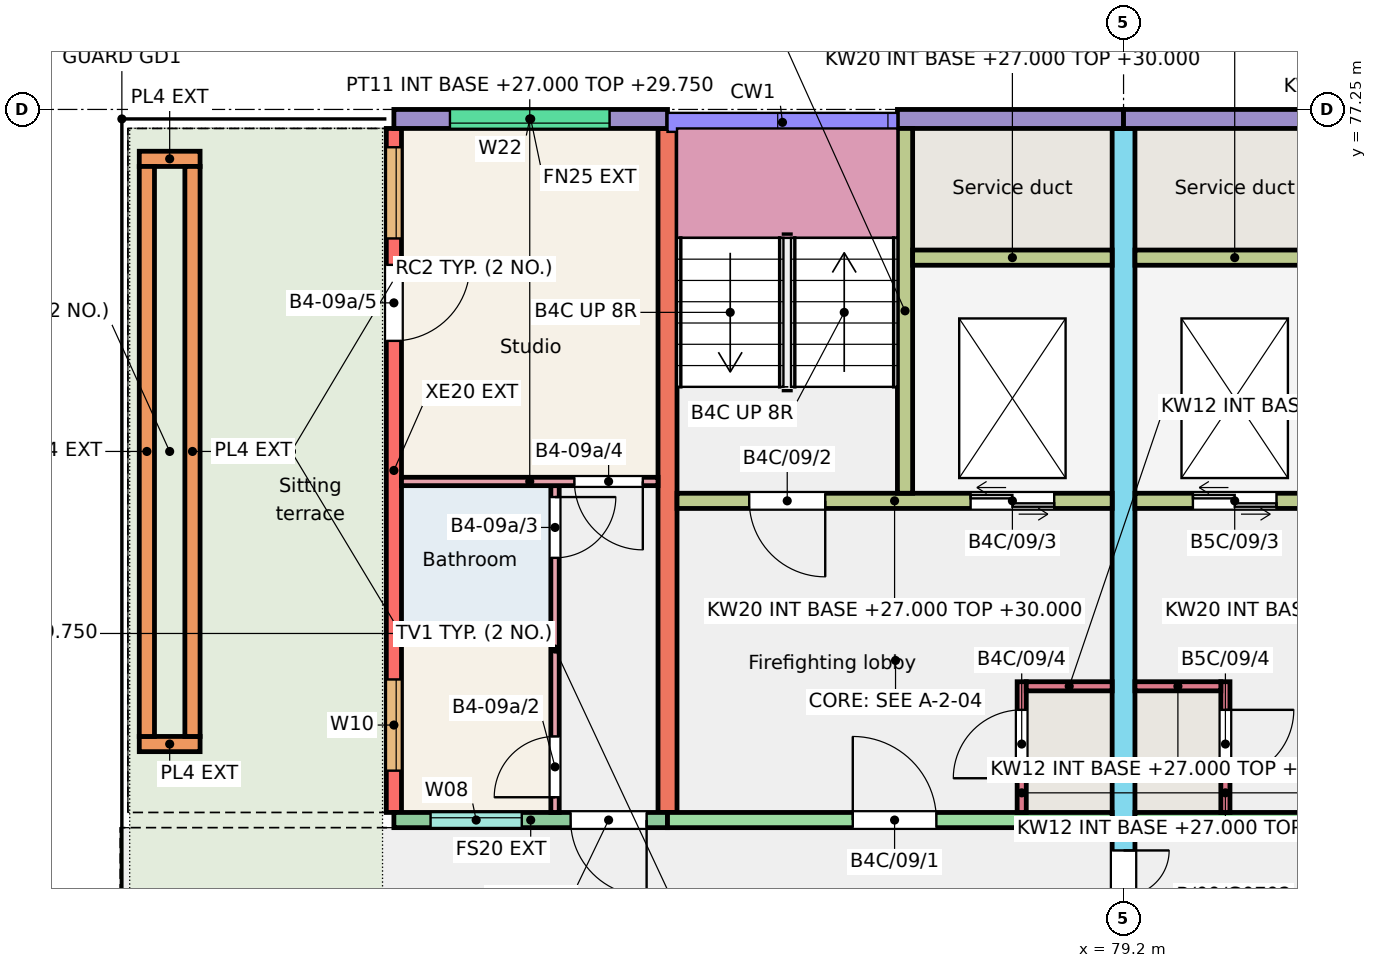
"""IFC4 building model, lengths in metres.
Left out: names, types, materials, properties, quantities, classifications, styles, units other than length and angle.
Written with IfcOpenShell. Run it as: python <this file> out.ifc"""

import sys

from ifc_helpers import new_model, si_unit, direction, frame, frame_2d, origin, place, context, subcontext, project, spatial, rectangle, extrude, element, fill, save


model = new_model("IFC4")
c1 = context("Model", 3, precision=1e-05, world=origin(), true_north=direction((0.0, 1.0)))
c2 = subcontext(c1, "Body", "Model", "MODEL_VIEW")
j1 = project(units=[si_unit("LENGTHUNIT", "METRE"), si_unit("PLANEANGLEUNIT", "RADIAN")], contexts=[c1])
p1 = place(None, origin())
s1 = spatial("IfcSite", under=j1, at=p1, CompositionType="ELEMENT")
p2 = place(p1, origin())
s2 = spatial("IfcBuilding", under=s1, at=p2, CompositionType="ELEMENT")
p3 = place(p2, frame((0.0, 0.0, 27.0)))
s3 = spatial("IfcBuildingStorey", under=s2, at=p3, CompositionType="ELEMENT", Elevation=27.0)
p4 = place(p3, frame((69.6, 68.0, 0.0), z_axis=(0.0, 0.0, 1.0), x_axis=(0.0, 1.0, 0.0)))
e1 = element("IfcWall", 1, at=p4, inside=s3, PredefinedType="SHEAR", context=c2, shape_type="SweptSolid", body=[
    extrude(rectangle(XDim=9.0, YDim=0.2, at=frame_2d((4.5, 0.0))), origin(), (0.0, 0.0, 1.0), 3.0),
])
p5 = place(p4, frame((0.55, 0.0, 0.9)))
e2 = element("IfcOpeningElement", 2, at=p5, cuts=e1, PredefinedType="OPENING", context=c2, shape_type="SweptSolid", body=[
    extrude(rectangle(XDim=1.2, YDim=1.5, at=frame_2d((0.6, 0.75))), frame((0.0, 0.11, 0.0), z_axis=(0.0, -1.0, 0.0), x_axis=(1.0, 0.0, 0.0)), (0.0, 0.0, 1.0), 0.22),
])
p6 = place(p4, frame((7.552, 0.0, 0.9)))
e3 = element("IfcOpeningElement", 3, at=p6, cuts=e1, PredefinedType="OPENING", context=c2, shape_type="SweptSolid", body=[
    extrude(rectangle(XDim=1.2, YDim=1.5, at=frame_2d((0.6, 0.75))), frame((0.0, 0.11, 0.0), z_axis=(0.0, -1.0, 0.0), x_axis=(1.0, 0.0, 0.0)), (0.0, 0.0, 1.0), 0.22),
])
p7 = place(p4, frame((6.205, 0.0, 0.0)))
e4 = element("IfcOpeningElement", 4, at=p7, cuts=e1, PredefinedType="OPENING", context=c2, shape_type="SweptSolid", body=[
    extrude(rectangle(XDim=1.0, YDim=2.1, at=frame_2d((0.5, 1.05))), frame((0.0, 0.11, 0.0), z_axis=(0.0, -1.0, 0.0), x_axis=(1.0, 0.0, 0.0)), (0.0, 0.0, 1.0), 0.22),
])
p8 = place(p3, frame((73.2, 68.0, 0.0), z_axis=(0.0, 0.0, 1.0), x_axis=(0.0, 1.0, 0.0)))
e5 = element("IfcWall", 5, at=p8, inside=s3, PredefinedType="SHEAR", context=c2, shape_type="SweptSolid", body=[
    extrude(rectangle(XDim=9.0, YDim=0.25, at=frame_2d((4.5, 0.0))), origin(), (0.0, 0.0, 1.0), 3.0),
])
p9 = place(p3, frame((79.2, 66.0, 0.0), z_axis=(0.0, 0.0, 1.0), x_axis=(0.0, 1.0, 0.0)))
e6 = element("IfcWall", 6, at=p9, inside=s3, PredefinedType="SHEAR", context=c2, shape_type="SweptSolid", body=[
    extrude(rectangle(XDim=11.0, YDim=0.3, at=frame_2d((5.5, 0.0))), origin(), (0.0, 0.0, 1.0), 3.0),
])
p10 = place(p9, frame((0.3, 0.0, 0.0)))
e7 = element("IfcOpeningElement", 7, at=p10, cuts=e6, PredefinedType="OPENING", context=c2, shape_type="SweptSolid", body=[
    extrude(rectangle(XDim=1.2, YDim=2.1, at=frame_2d((0.6, 1.05))), frame((0.0, 0.16, 0.0), z_axis=(0.0, -1.0, 0.0), x_axis=(1.0, 0.0, 0.0)), (0.0, 0.0, 1.0), 0.32),
])
p11 = place(p3, frame((69.6, 77.125, 0.0), z_axis=(0.0, 0.0, 1.0), x_axis=(1.0, 0.0, 0.0)))
e8 = element("IfcWall", 8, at=p11, inside=s3, PredefinedType="SOLIDWALL", context=c2, shape_type="SweptSolid", body=[
    extrude(rectangle(XDim=3.6, YDim=0.25, at=frame_2d((1.8, 0.0))), origin(), (0.0, 0.0, 1.0), 3.0),
])
p12 = place(p11, frame((0.738, 0.0, 1.2)))
e9 = element("IfcOpeningElement", 9, at=p12, cuts=e8, PredefinedType="OPENING", context=c2, shape_type="SweptSolid", body=[
    extrude(rectangle(XDim=2.1, YDim=1.2, at=frame_2d((1.05, 0.6))), frame((0.0, 0.135, 0.0), z_axis=(0.0, -1.0, 0.0), x_axis=(1.0, 0.0, 0.0)), (0.0, 0.0, 1.0), 0.27),
])
p13 = place(p3, frame((69.6, 67.9, 0.0), z_axis=(0.0, 0.0, 1.0), x_axis=(1.0, 0.0, 0.0)))
e10 = element("IfcWall", 10, at=p13, inside=s3, PredefinedType="SOLIDWALL", context=c2, shape_type="SweptSolid", body=[
    extrude(rectangle(XDim=3.6, YDim=0.2, at=frame_2d((1.8, 0.0))), origin(), (0.0, 0.0, 1.0), 3.0),
])
p14 = place(p13, frame((0.482, 0.0, 1.1)))
e11 = element("IfcOpeningElement", 11, at=p14, cuts=e10, PredefinedType="OPENING", context=c2, shape_type="SweptSolid", body=[
    extrude(rectangle(XDim=1.2, YDim=1.3, at=frame_2d((0.6, 0.65))), frame((0.0, 0.11, 0.0), z_axis=(0.0, -1.0, 0.0), x_axis=(1.0, 0.0, 0.0)), (0.0, 0.0, 1.0), 0.22),
])
p15 = place(p13, frame((2.325, 0.0, 0.0)))
e12 = element("IfcOpeningElement", 12, at=p15, cuts=e10, PredefinedType="OPENING", context=c2, shape_type="SweptSolid", body=[
    extrude(rectangle(XDim=1.0, YDim=2.1, at=frame_2d((0.5, 1.05))), frame((0.0, 0.11, 0.0), z_axis=(0.0, -1.0, 0.0), x_axis=(1.0, 0.0, 0.0)), (0.0, 0.0, 1.0), 0.22),
])
p16 = place(p3, frame((76.225, 77.125, 0.0), z_axis=(0.0, 0.0, 1.0), x_axis=(1.0, 0.0, 0.0)))
e13 = element("IfcWall", 13, at=p16, inside=s3, PredefinedType="SOLIDWALL", context=c2, shape_type="SweptSolid", body=[
    extrude(rectangle(XDim=2.975, YDim=0.25, at=frame_2d((1.487, 0.0))), origin(), (0.0, 0.0, 1.0), 3.0),
])
p17 = place(p3, frame((73.2, 67.9, 0.0), z_axis=(0.0, 0.0, 1.0), x_axis=(1.0, 0.0, 0.0)))
e14 = element("IfcWall", 14, at=p17, inside=s3, PredefinedType="SHEAR", context=c2, shape_type="SweptSolid", body=[
    extrude(rectangle(XDim=5.85, YDim=0.2, at=frame_2d((2.925, 0.0))), origin(), (0.0, 0.0, 1.0), 3.0),
])
p18 = place(p17, frame((2.438, 0.0, 0.0)))
e15 = element("IfcOpeningElement", 15, at=p18, cuts=e14, PredefinedType="OPENING", context=c2, shape_type="SweptSolid", body=[
    extrude(rectangle(XDim=1.1, YDim=2.1, at=frame_2d((0.55, 1.05))), frame((0.0, 0.11, 0.0), z_axis=(0.0, -1.0, 0.0), x_axis=(1.0, 0.0, 0.0)), (0.0, 0.0, 1.0), 0.22),
])
p19 = place(p3, frame((73.325, 72.1, 0.0), z_axis=(0.0, 0.0, 1.0), x_axis=(1.0, 0.0, 0.0)))
e16 = element("IfcWall", 16, at=p19, inside=s3, PredefinedType="SHEAR", context=c2, shape_type="SweptSolid", body=[
    extrude(rectangle(XDim=5.725, YDim=0.2, at=frame_2d((2.863, 0.0))), origin(), (0.0, 0.0, 1.0), 3.0),
])
p20 = place(p19, frame((0.95, 0.0, 0.0)))
e17 = element("IfcOpeningElement", 17, at=p20, cuts=e16, PredefinedType="OPENING", context=c2, shape_type="SweptSolid", body=[
    extrude(rectangle(XDim=1.0, YDim=2.1, at=frame_2d((0.5, 1.05))), frame((0.0, 0.11, 0.0), z_axis=(0.0, -1.0, 0.0), x_axis=(1.0, 0.0, 0.0)), (0.0, 0.0, 1.0), 0.22),
])
p21 = place(p19, frame((3.863, 0.0, 0.0)))
e18 = element("IfcOpeningElement", 18, at=p21, cuts=e16, PredefinedType="OPENING", context=c2, shape_type="SweptSolid", body=[
    extrude(rectangle(XDim=1.1, YDim=2.1, at=frame_2d((0.55, 1.05))), frame((0.0, 0.11, 0.0), z_axis=(0.0, -1.0, 0.0), x_axis=(1.0, 0.0, 0.0)), (0.0, 0.0, 1.0), 0.22),
])
p22 = place(p3, frame((76.325, 72.2, 0.0), z_axis=(0.0, 0.0, 1.0), x_axis=(0.0, 1.0, 0.0)))
e19 = element("IfcWall", 19, at=p22, inside=s3, PredefinedType="SHEAR", context=c2, shape_type="SweptSolid", body=[
    extrude(rectangle(XDim=4.8, YDim=0.2, at=frame_2d((2.4, 0.0))), origin(), (0.0, 0.0, 1.0), 3.0),
])
p23 = place(p3, frame((76.425, 75.3, 0.0), z_axis=(0.0, 0.0, 1.0), x_axis=(1.0, 0.0, 0.0)))
e20 = element("IfcWall", 20, at=p23, inside=s3, PredefinedType="SHEAR", context=c2, shape_type="SweptSolid", body=[
    extrude(rectangle(XDim=2.625, YDim=0.2, at=frame_2d((1.312, 0.0))), origin(), (0.0, 0.0, 1.0), 3.0),
])
p24 = place(p3, frame((77.86, 68.0, 0.0), z_axis=(0.0, 0.0, 1.0), x_axis=(0.0, 1.0, 0.0)))
e21 = element("IfcWall", 21, at=p24, inside=s3, PredefinedType="SHEAR", context=c2, shape_type="SweptSolid", body=[
    extrude(rectangle(XDim=1.72, YDim=0.12, at=frame_2d((0.86, 0.0))), origin(), (0.0, 0.0, 1.0), 3.0),
])
p25 = place(p24, frame((0.45, 0.0, 0.0)))
e22 = element("IfcOpeningElement", 22, at=p25, cuts=e21, PredefinedType="OPENING", context=c2, shape_type="SweptSolid", body=[
    extrude(rectangle(XDim=0.9, YDim=2.1, at=frame_2d((0.45, 1.05))), frame((0.0, 0.07, 0.0), z_axis=(0.0, -1.0, 0.0), x_axis=(1.0, 0.0, 0.0)), (0.0, 0.0, 1.0), 0.14),
])
p26 = place(p3, frame((77.92, 69.66, 0.0), z_axis=(0.0, 0.0, 1.0), x_axis=(1.0, 0.0, 0.0)))
e23 = element("IfcWall", 23, at=p26, inside=s3, PredefinedType="SHEAR", context=c2, shape_type="SweptSolid", body=[
    extrude(rectangle(XDim=1.13, YDim=0.12, at=frame_2d((0.565, 0.0))), origin(), (0.0, 0.0, 1.0), 3.0),
])
p27 = place(p3, frame((79.2, 77.125, 0.0), z_axis=(0.0, 0.0, 1.0), x_axis=(1.0, 0.0, 0.0)))
e24 = element("IfcWall", 24, at=p27, inside=s3, PredefinedType="SOLIDWALL", context=c2, shape_type="SweptSolid", body=[
    extrude(rectangle(XDim=2.975, YDim=0.25, at=frame_2d((1.488, 0.0))), origin(), (0.0, 0.0, 1.0), 3.0),
])
p28 = place(p3, frame((79.35, 67.9, 0.0), z_axis=(0.0, 0.0, 1.0), x_axis=(1.0, 0.0, 0.0)))
e25 = element("IfcWall", 25, at=p28, inside=s3, PredefinedType="SHEAR", context=c2, shape_type="SweptSolid", body=[
    extrude(rectangle(XDim=5.85, YDim=0.2, at=frame_2d((2.925, 0.0))), origin(), (0.0, 0.0, 1.0), 2.75),
])
p29 = place(p28, frame((2.312, 0.0, 0.0)))
e26 = element("IfcOpeningElement", 26, at=p29, cuts=e25, PredefinedType="OPENING", context=c2, shape_type="SweptSolid", body=[
    extrude(rectangle(XDim=1.1, YDim=2.1, at=frame_2d((0.55, 1.05))), frame((0.0, 0.11, 0.0), z_axis=(0.0, -1.0, 0.0), x_axis=(1.0, 0.0, 0.0)), (0.0, 0.0, 1.0), 0.22),
])
p30 = place(p3, frame((79.35, 72.1, 0.0), z_axis=(0.0, 0.0, 1.0), x_axis=(1.0, 0.0, 0.0)))
e27 = element("IfcWall", 27, at=p30, inside=s3, PredefinedType="SHEAR", context=c2, shape_type="SweptSolid", body=[
    extrude(rectangle(XDim=5.725, YDim=0.2, at=frame_2d((2.862, 0.0))), origin(), (0.0, 0.0, 1.0), 2.75),
])
p31 = place(p30, frame((3.775, 0.0, 0.0)))
e28 = element("IfcOpeningElement", 28, at=p31, cuts=e27, PredefinedType="OPENING", context=c2, shape_type="SweptSolid", body=[
    extrude(rectangle(XDim=1.0, YDim=2.1, at=frame_2d((0.5, 1.05))), frame((0.0, 0.11, 0.0), z_axis=(0.0, -1.0, 0.0), x_axis=(1.0, 0.0, 0.0)), (0.0, 0.0, 1.0), 0.22),
])
p32 = place(p30, frame((0.762, 0.0, 0.0)))
e29 = element("IfcOpeningElement", 29, at=p32, cuts=e27, PredefinedType="OPENING", context=c2, shape_type="SweptSolid", body=[
    extrude(rectangle(XDim=1.1, YDim=2.1, at=frame_2d((0.55, 1.05))), frame((0.0, 0.11, 0.0), z_axis=(0.0, -1.0, 0.0), x_axis=(1.0, 0.0, 0.0)), (0.0, 0.0, 1.0), 0.22),
])
p33 = place(p3, frame((79.35, 75.3, 0.0), z_axis=(0.0, 0.0, 1.0), x_axis=(1.0, 0.0, 0.0)))
e30 = element("IfcWall", 30, at=p33, inside=s3, PredefinedType="SHEAR", context=c2, shape_type="SweptSolid", body=[
    extrude(rectangle(XDim=2.625, YDim=0.2, at=frame_2d((1.312, 0.0))), origin(), (0.0, 0.0, 1.0), 2.75),
])
p34 = place(p3, frame((80.54, 68.0, 0.0), z_axis=(0.0, 0.0, 1.0), x_axis=(0.0, 1.0, 0.0)))
e31 = element("IfcWall", 31, at=p34, inside=s3, PredefinedType="SHEAR", context=c2, shape_type="SweptSolid", body=[
    extrude(rectangle(XDim=1.72, YDim=0.12, at=frame_2d((0.86, 0.0))), origin(), (0.0, 0.0, 1.0), 2.75),
])
p35 = place(p34, frame((0.45, 0.0, 0.0)))
e32 = element("IfcOpeningElement", 32, at=p35, cuts=e31, PredefinedType="OPENING", context=c2, shape_type="SweptSolid", body=[
    extrude(rectangle(XDim=0.9, YDim=2.1, at=frame_2d((0.45, 1.05))), frame((0.0, 0.07, 0.0), z_axis=(0.0, -1.0, 0.0), x_axis=(1.0, 0.0, 0.0)), (0.0, 0.0, 1.0), 0.14),
])
p36 = place(p3, frame((79.35, 69.66, 0.0), z_axis=(0.0, 0.0, 1.0), x_axis=(1.0, 0.0, 0.0)))
e33 = element("IfcWall", 33, at=p36, inside=s3, PredefinedType="SHEAR", context=c2, shape_type="SweptSolid", body=[
    extrude(rectangle(XDim=1.13, YDim=0.12, at=frame_2d((0.565, 0.0))), origin(), (0.0, 0.0, 1.0), 2.75),
])
for number, where, z_axis, x_axis in (
    (34, (66.25, 68.9, 0.01), (0.0, 0.0, 1.0), (1.0, 0.0, 0.0)),
    (35, (66.25, 76.6, 0.01), (0.0, 0.0, 1.0), (1.0, 0.0, 0.0)),
):
    element("IfcWall", number, at=place(p3, frame(where, z_axis=z_axis, x_axis=x_axis)), inside=s3, PredefinedType="SOLIDWALL", context=c2, shape_type="SweptSolid", body=[
        extrude(rectangle(XDim=0.8, YDim=0.2, at=frame_2d((0.4, 0.0))), origin(), (0.0, 0.0, 1.0), 0.45),
    ])
for number, where, z_axis, x_axis in (
    (36, (66.35, 69.0, 0.01), (0.0, 0.0, 1.0), (0.0, 1.0, 0.0)),
    (37, (66.95, 69.0, 0.01), (0.0, 0.0, 1.0), (0.0, 1.0, 0.0)),
):
    element("IfcWall", number, at=place(p3, frame(where, z_axis=z_axis, x_axis=x_axis)), inside=s3, PredefinedType="SOLIDWALL", context=c2, shape_type="SweptSolid", body=[
        extrude(rectangle(XDim=7.5, YDim=0.2, at=frame_2d((3.75, 0.0))), origin(), (0.0, 0.0, 1.0), 0.45),
    ])
p37 = place(p3, frame((69.7, 70.355, 0.0), z_axis=(0.0, 0.0, 1.0), x_axis=(1.0, 0.0, 0.0)))
e38 = element("IfcWall", 38, at=p37, inside=s3, PredefinedType="PARTITIONING", context=c2, shape_type="SweptSolid", body=[
    extrude(rectangle(XDim=1.965, YDim=0.11, at=frame_2d((0.982, 0.0))), origin(), (0.0, 0.0, 1.0), 2.75),
])
p38 = place(p3, frame((71.72, 68.0, 0.0), z_axis=(0.0, 0.0, 1.0), x_axis=(0.0, 1.0, 0.0)))
e39 = element("IfcWall", 39, at=p38, inside=s3, PredefinedType="PARTITIONING", context=c2, shape_type="SweptSolid", body=[
    extrude(rectangle(XDim=4.3, YDim=0.11, at=frame_2d((2.15, 0.0))), origin(), (0.0, 0.0, 1.0), 2.75),
])
p39 = place(p38, frame((0.2, 0.0, 0.0)))
e40 = element("IfcOpeningElement", 40, at=p39, cuts=e39, PredefinedType="OPENING", context=c2, shape_type="SweptSolid", body=[
    extrude(rectangle(XDim=0.8, YDim=2.1, at=frame_2d((0.4, 1.05))), frame((0.0, 0.065, 0.0), z_axis=(0.0, -1.0, 0.0), x_axis=(1.0, 0.0, 0.0)), (0.0, 0.0, 1.0), 0.13),
])
p40 = place(p38, frame((3.35, 0.0, 0.0)))
e41 = element("IfcOpeningElement", 41, at=p40, cuts=e39, PredefinedType="OPENING", context=c2, shape_type="SweptSolid", body=[
    extrude(rectangle(XDim=0.8, YDim=2.1, at=frame_2d((0.4, 1.05))), frame((0.0, 0.065, 0.0), z_axis=(0.0, -1.0, 0.0), x_axis=(1.0, 0.0, 0.0)), (0.0, 0.0, 1.0), 0.13),
])
p41 = place(p3, frame((69.7, 72.355, 0.0), z_axis=(0.0, 0.0, 1.0), x_axis=(1.0, 0.0, 0.0)))
e42 = element("IfcWall", 42, at=p41, inside=s3, PredefinedType="PARTITIONING", context=c2, shape_type="SweptSolid", body=[
    extrude(rectangle(XDim=3.375, YDim=0.11, at=frame_2d((1.688, 0.0))), origin(), (0.0, 0.0, 1.0), 2.75),
])
p42 = place(p41, frame((2.275, 0.0, 0.0)))
e43 = element("IfcOpeningElement", 43, at=p42, cuts=e42, PredefinedType="OPENING", context=c2, shape_type="SweptSolid", body=[
    extrude(rectangle(XDim=0.9, YDim=2.1, at=frame_2d((0.45, 1.05))), frame((0.0, 0.065, 0.0), z_axis=(0.0, -1.0, 0.0), x_axis=(1.0, 0.0, 0.0)), (0.0, 0.0, 1.0), 0.13),
])
p43 = place(p14, origin())
e44 = element("IfcWindow", 44, at=p43, inside=s3, PartitioningType="SINGLE_PANEL", PredefinedType="WINDOW", context=c2, shape_type="SweptSolid", body=[
    extrude(rectangle(XDim=1.2, YDim=1.3, at=frame_2d((0.6, 0.65))), frame((0.0, 0.06, 0.0), z_axis=(0.0, -1.0, 0.0), x_axis=(1.0, 0.0, 0.0)), (0.0, 0.0, 1.0), 0.06),
])
fill(e11, e44)
p44 = place(p12, origin())
e45 = element("IfcWindow", 45, at=p44, inside=s3, PartitioningType="SINGLE_PANEL", PredefinedType="WINDOW", context=c2, shape_type="SweptSolid", body=[
    extrude(rectangle(XDim=2.1, YDim=1.2, at=frame_2d((1.05, 0.6))), frame((0.0, -0.025, 0.0), z_axis=(0.0, -1.0, 0.0), x_axis=(1.0, 0.0, 0.0)), (0.0, 0.0, 1.0), 0.06),
])
fill(e9, e45)
p45 = place(p5, origin())
e46 = element("IfcWindow", 46, at=p45, inside=s3, PartitioningType="SINGLE_PANEL", PredefinedType="WINDOW", context=c2, shape_type="SweptSolid", body=[
    extrude(rectangle(XDim=1.2, YDim=1.5, at=frame_2d((0.6, 0.75))), frame((0.0, 0.0, 0.0), z_axis=(0.0, -1.0, 0.0), x_axis=(1.0, 0.0, 0.0)), (0.0, 0.0, 1.0), 0.06),
])
fill(e2, e46)
p46 = place(p6, origin())
e47 = element("IfcWindow", 47, at=p46, inside=s3, PartitioningType="SINGLE_PANEL", PredefinedType="WINDOW", context=c2, shape_type="SweptSolid", body=[
    extrude(rectangle(XDim=1.2, YDim=1.5, at=frame_2d((0.6, 0.75))), frame((0.0, 0.0, 0.0), z_axis=(0.0, -1.0, 0.0), x_axis=(1.0, 0.0, 0.0)), (0.0, 0.0, 1.0), 0.06),
])
fill(e3, e47)
p47 = place(p15, origin())
e48 = element("IfcDoor", 48, at=p47, inside=s3, OperationType="SINGLE_SWING_RIGHT", PredefinedType="DOOR", context=c2, shape_type="SweptSolid", body=[
    extrude(rectangle(XDim=1.0, YDim=2.1, at=frame_2d((0.5, 1.05))), frame((0.0, 0.025, 0.0), z_axis=(0.0, -1.0, 0.0), x_axis=(1.0, 0.0, 0.0)), (0.0, 0.0, 1.0), 0.05),
])
fill(e12, e48)
p48 = place(p39, origin())
e49 = element("IfcDoor", 49, at=p48, inside=s3, OperationType="SINGLE_SWING_LEFT", PredefinedType="DOOR", context=c2, shape_type="SweptSolid", body=[
    extrude(rectangle(XDim=0.8, YDim=2.1, at=frame_2d((0.4, 1.05))), frame((0.0, 0.025, 0.0), z_axis=(0.0, -1.0, 0.0), x_axis=(1.0, 0.0, 0.0)), (0.0, 0.0, 1.0), 0.05),
])
fill(e40, e49)
p49 = place(p40, origin())
e50 = element("IfcDoor", 50, at=p49, inside=s3, OperationType="SINGLE_SWING_RIGHT", PredefinedType="DOOR", context=c2, shape_type="SweptSolid", body=[
    extrude(rectangle(XDim=0.8, YDim=2.1, at=frame_2d((0.4, 1.05))), frame((0.0, 0.025, 0.0), z_axis=(0.0, -1.0, 0.0), x_axis=(1.0, 0.0, 0.0)), (0.0, 0.0, 1.0), 0.05),
])
fill(e41, e50)
p50 = place(p42, origin())
e51 = element("IfcDoor", 51, at=p50, inside=s3, OperationType="SINGLE_SWING_RIGHT", PredefinedType="DOOR", context=c2, shape_type="SweptSolid", body=[
    extrude(rectangle(XDim=0.9, YDim=2.1, at=frame_2d((0.45, 1.05))), frame((0.0, 0.025, 0.0), z_axis=(0.0, -1.0, 0.0), x_axis=(1.0, 0.0, 0.0)), (0.0, 0.0, 1.0), 0.05),
])
fill(e43, e51)
p51 = place(p7, origin())
e52 = element("IfcDoor", 52, at=p51, inside=s3, OperationType="SINGLE_SWING_RIGHT", PredefinedType="DOOR", context=c2, shape_type="SweptSolid", body=[
    extrude(rectangle(XDim=1.0, YDim=2.1, at=frame_2d((0.5, 1.05))), frame((0.0, 0.025, 0.0), z_axis=(0.0, -1.0, 0.0), x_axis=(1.0, 0.0, 0.0)), (0.0, 0.0, 1.0), 0.05),
])
fill(e4, e52)
p52 = place(p18, origin())
e53 = element("IfcDoor", 53, at=p52, inside=s3, OperationType="SINGLE_SWING_LEFT", PredefinedType="DOOR", context=c2, shape_type="SweptSolid", body=[
    extrude(rectangle(XDim=1.1, YDim=2.1, at=frame_2d((0.55, 1.05))), frame((0.0, 0.025, 0.0), z_axis=(0.0, -1.0, 0.0), x_axis=(1.0, 0.0, 0.0)), (0.0, 0.0, 1.0), 0.05),
])
fill(e15, e53)
p53 = place(p20, origin())
e54 = element("IfcDoor", 54, at=p53, inside=s3, OperationType="SINGLE_SWING_RIGHT", PredefinedType="DOOR", context=c2, shape_type="SweptSolid", body=[
    extrude(rectangle(XDim=1.0, YDim=2.1, at=frame_2d((0.5, 1.05))), frame((0.0, 0.025, 0.0), z_axis=(0.0, -1.0, 0.0), x_axis=(1.0, 0.0, 0.0)), (0.0, 0.0, 1.0), 0.05),
])
fill(e17, e54)
p54 = place(p21, origin())
e55 = element("IfcDoor", 55, at=p54, inside=s3, OperationType="DOUBLE_DOOR_SLIDING", PredefinedType="DOOR", context=c2, shape_type="SweptSolid", body=[
    extrude(rectangle(XDim=1.1, YDim=2.1, at=frame_2d((0.55, 1.05))), frame((0.0, 0.025, 0.0), z_axis=(0.0, -1.0, 0.0), x_axis=(1.0, 0.0, 0.0)), (0.0, 0.0, 1.0), 0.05),
])
fill(e18, e55)
p55 = place(p25, origin())
e56 = element("IfcDoor", 56, at=p55, inside=s3, OperationType="SINGLE_SWING_LEFT", PredefinedType="DOOR", context=c2, shape_type="SweptSolid", body=[
    extrude(rectangle(XDim=0.9, YDim=2.1, at=frame_2d((0.45, 1.05))), frame((0.0, 0.025, 0.0), z_axis=(0.0, -1.0, 0.0), x_axis=(1.0, 0.0, 0.0)), (0.0, 0.0, 1.0), 0.05),
])
fill(e22, e56)
p56 = place(p32, origin())
e57 = element("IfcDoor", 57, at=p56, inside=s3, OperationType="DOUBLE_DOOR_SLIDING", PredefinedType="DOOR", context=c2, shape_type="SweptSolid", body=[
    extrude(rectangle(XDim=1.1, YDim=2.1, at=frame_2d((0.55, 1.05))), frame((0.0, 0.025, 0.0), z_axis=(0.0, -1.0, 0.0), x_axis=(1.0, 0.0, 0.0)), (0.0, 0.0, 1.0), 0.05),
])
fill(e29, e57)
p57 = place(p35, origin())
e58 = element("IfcDoor", 58, at=p57, inside=s3, OperationType="SINGLE_SWING_RIGHT", PredefinedType="DOOR", context=c2, shape_type="SweptSolid", body=[
    extrude(rectangle(XDim=0.9, YDim=2.1, at=frame_2d((0.45, 1.05))), frame((0.0, 0.025, 0.0), z_axis=(0.0, -1.0, 0.0), x_axis=(1.0, 0.0, 0.0)), (0.0, 0.0, 1.0), 0.05),
])
fill(e32, e58)
p58 = place(p10, origin())
e59 = element("IfcDoor", 59, at=p58, inside=s3, OperationType="DOUBLE_DOOR_SINGLE_SWING", PredefinedType="DOOR", context=c2, shape_type="SweptSolid", body=[
    extrude(rectangle(XDim=1.2, YDim=2.1, at=frame_2d((0.6, 1.05))), frame((0.0, 0.025, 0.0), z_axis=(0.0, -1.0, 0.0), x_axis=(1.0, 0.0, 0.0)), (0.0, 0.0, 1.0), 0.05),
])
fill(e7, e59)
save(model, sys.argv[1])
